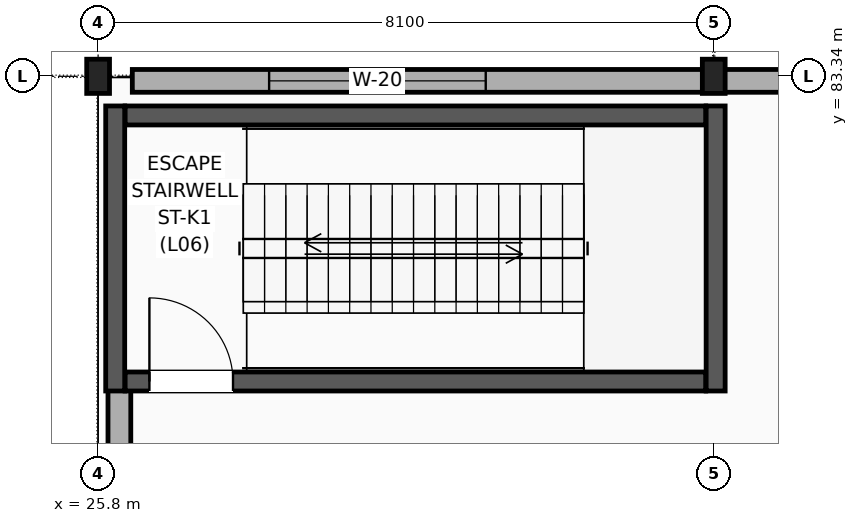
"""IFC4 building model, lengths in metres.
Left out: names, types, materials, properties, quantities, classifications, styles, units other than length and angle.
Written with IfcOpenShell. Run it as: python <this file> out.ifc"""

import sys

from ifc_helpers import new_model, si_unit, direction, frame, frame_2d, origin, origin_2d, place, context, subcontext, project, spatial, rectangle, i_section, extrude, element, fill, save


model = new_model("IFC4")
c1 = context("Model", 3, precision=1e-05, world=origin(), true_north=direction((0.0, 1.0)))
c2 = subcontext(c1, "Body", "Model", "MODEL_VIEW")
j1 = project(units=[si_unit("LENGTHUNIT", "METRE"), si_unit("PLANEANGLEUNIT", "RADIAN")], contexts=[c1])
p1 = place(None, origin())
s1 = spatial("IfcSite", under=j1, at=p1, CompositionType="ELEMENT")
p2 = place(p1, origin())
s2 = spatial("IfcBuilding", under=s1, at=p2, CompositionType="ELEMENT")
p3 = place(p2, frame((0.0, 0.0, 27.6)))
s3 = spatial("IfcBuildingStorey", under=s2, at=p3, CompositionType="ELEMENT", Elevation=27.6)
for number, where, z_axis, x_axis in (
    (1, (25.8, 83.34, 0.0), (0.0, 0.0, 1.0), (1.0, 0.0, 0.0)),
    (2, (33.9, 83.34, 0.0), (0.0, 0.0, 1.0), (1.0, 0.0, 0.0)),
):
    element("IfcColumn", number, at=place(p3, frame(where, z_axis=z_axis, x_axis=x_axis)), inside=s3, PredefinedType="COLUMN", context=c2, shape_type="SweptSolid", body=[
        extrude(i_section(OverallWidth=0.3, OverallDepth=0.45, WebThickness=0.014, FlangeThickness=0.026, FilletRadius=0.027, at=origin_2d()), origin(), (0.0, 0.0, 1.0), 6.0),
    ])
p4 = place(p3, frame((26.08, 61.35, 0.0), z_axis=(0.0, 0.0, 1.0), x_axis=(0.0, 1.0, 0.0)))
e3 = element("IfcWall", 3, at=p4, inside=s3, PredefinedType="SOLIDWALL", context=c2, shape_type="SweptSolid", body=[
    extrude(rectangle(XDim=17.95, YDim=0.3, at=frame_2d((8.975, 0.0))), origin(), (0.0, 0.0, 1.0), 5.145),
])
p5 = place(p3, frame((26.25, 83.28, 0.0), z_axis=(0.0, 0.0, 1.0), x_axis=(1.0, 0.0, 0.0)))
e4 = element("IfcWall", 4, at=p5, inside=s3, PredefinedType="SOLIDWALL", context=c2, shape_type="SweptSolid", body=[
    extrude(rectangle(XDim=31.5, YDim=0.3, at=frame_2d((15.75, 0.0))), origin(), (0.0, 0.0, 1.0), 5.145),
])
p6 = place(p5, frame((1.8, 0.0, 1.5)))
e5 = element("IfcOpeningElement", 5, at=p6, cuts=e4, PredefinedType="OPENING", context=c2, shape_type="SweptSolid", body=[
    extrude(rectangle(XDim=2.85, YDim=1.65, at=frame_2d((1.425, 0.825))), frame((0.0, 0.16, 0.0), z_axis=(0.0, -1.0, 0.0), x_axis=(1.0, 0.0, 0.0)), (0.0, 0.0, 1.0), 0.32),
])
p7 = place(p5, frame((25.6, 0.0, 1.5)))
e6 = element("IfcOpeningElement", 6, at=p7, cuts=e4, PredefinedType="OPENING", context=c2, shape_type="SweptSolid", body=[
    extrude(rectangle(XDim=2.85, YDim=1.65, at=frame_2d((1.425, 0.825))), frame((0.0, 0.16, 0.0), z_axis=(0.0, -1.0, 0.0), x_axis=(1.0, 0.0, 0.0)), (0.0, 0.0, 1.0), 0.32),
])
p8 = place(p3, frame((26.155, 79.325, 0.0), z_axis=(0.0, 0.0, 1.0), x_axis=(1.0, 0.0, 0.0)))
e7 = element("IfcWall", 7, at=p8, inside=s3, PredefinedType="SHEAR", context=c2, shape_type="SweptSolid", body=[
    extrude(rectangle(XDim=7.64, YDim=0.25, at=frame_2d((3.82, 0.0))), origin(), (0.0, 0.0, 1.0), 5.765),
])
p9 = place(p8, frame((0.32, 0.0, 0.0)))
e8 = element("IfcOpeningElement", 8, at=p9, cuts=e7, PredefinedType="OPENING", context=c2, shape_type="SweptSolid", body=[
    extrude(rectangle(XDim=1.1, YDim=2.2, at=frame_2d((0.55, 1.1))), frame((0.0, 0.135, 0.0), z_axis=(0.0, -1.0, 0.0), x_axis=(1.0, 0.0, 0.0)), (0.0, 0.0, 1.0), 0.27),
])
p10 = place(p3, frame((26.155, 82.825, 0.0), z_axis=(0.0, 0.0, 1.0), x_axis=(1.0, 0.0, 0.0)))
e9 = element("IfcWall", 9, at=p10, inside=s3, PredefinedType="SHEAR", context=c2, shape_type="SweptSolid", body=[
    extrude(rectangle(XDim=7.64, YDim=0.25, at=frame_2d((3.82, 0.0))), origin(), (0.0, 0.0, 1.0), 5.765),
])
for number, where, z_axis, x_axis in (
    (10, (26.025, 79.2, 0.0), (0.0, 0.0, 1.0), (0.0, 1.0, 0.0)),
    (11, (33.925, 79.2, 0.0), (0.0, 0.0, 1.0), (0.0, 1.0, 0.0)),
):
    element("IfcWall", number, at=place(p3, frame(where, z_axis=z_axis, x_axis=x_axis)), inside=s3, PredefinedType="SHEAR", context=c2, shape_type="SweptSolid", body=[
        extrude(rectangle(XDim=3.75, YDim=0.25, at=frame_2d((1.875, 0.0))), origin(), (0.0, 0.0, 1.0), 5.765),
    ])
p11 = place(p6, origin())
e12 = element("IfcWindow", 12, at=p11, inside=s3, PartitioningType="SINGLE_PANEL", PredefinedType="WINDOW", context=c2, shape_type="SweptSolid", body=[
    extrude(rectangle(XDim=2.85, YDim=1.65, at=frame_2d((1.425, 0.825))), frame((0.0, 0.03, 0.0), z_axis=(0.0, -1.0, 0.0), x_axis=(1.0, 0.0, 0.0)), (0.0, 0.0, 1.0), 0.06),
])
fill(e5, e12)
p12 = place(p9, origin())
e13 = element("IfcDoor", 13, at=p12, inside=s3, OperationType="SINGLE_SWING_LEFT", PredefinedType="DOOR", context=c2, shape_type="SweptSolid", body=[
    extrude(rectangle(XDim=1.1, YDim=2.2, at=frame_2d((0.55, 1.1))), frame((0.0, 0.025, 0.0), z_axis=(0.0, -1.0, 0.0), x_axis=(1.0, 0.0, 0.0)), (0.0, 0.0, 1.0), 0.05),
])
fill(e8, e13)
save(model, sys.argv[1])
